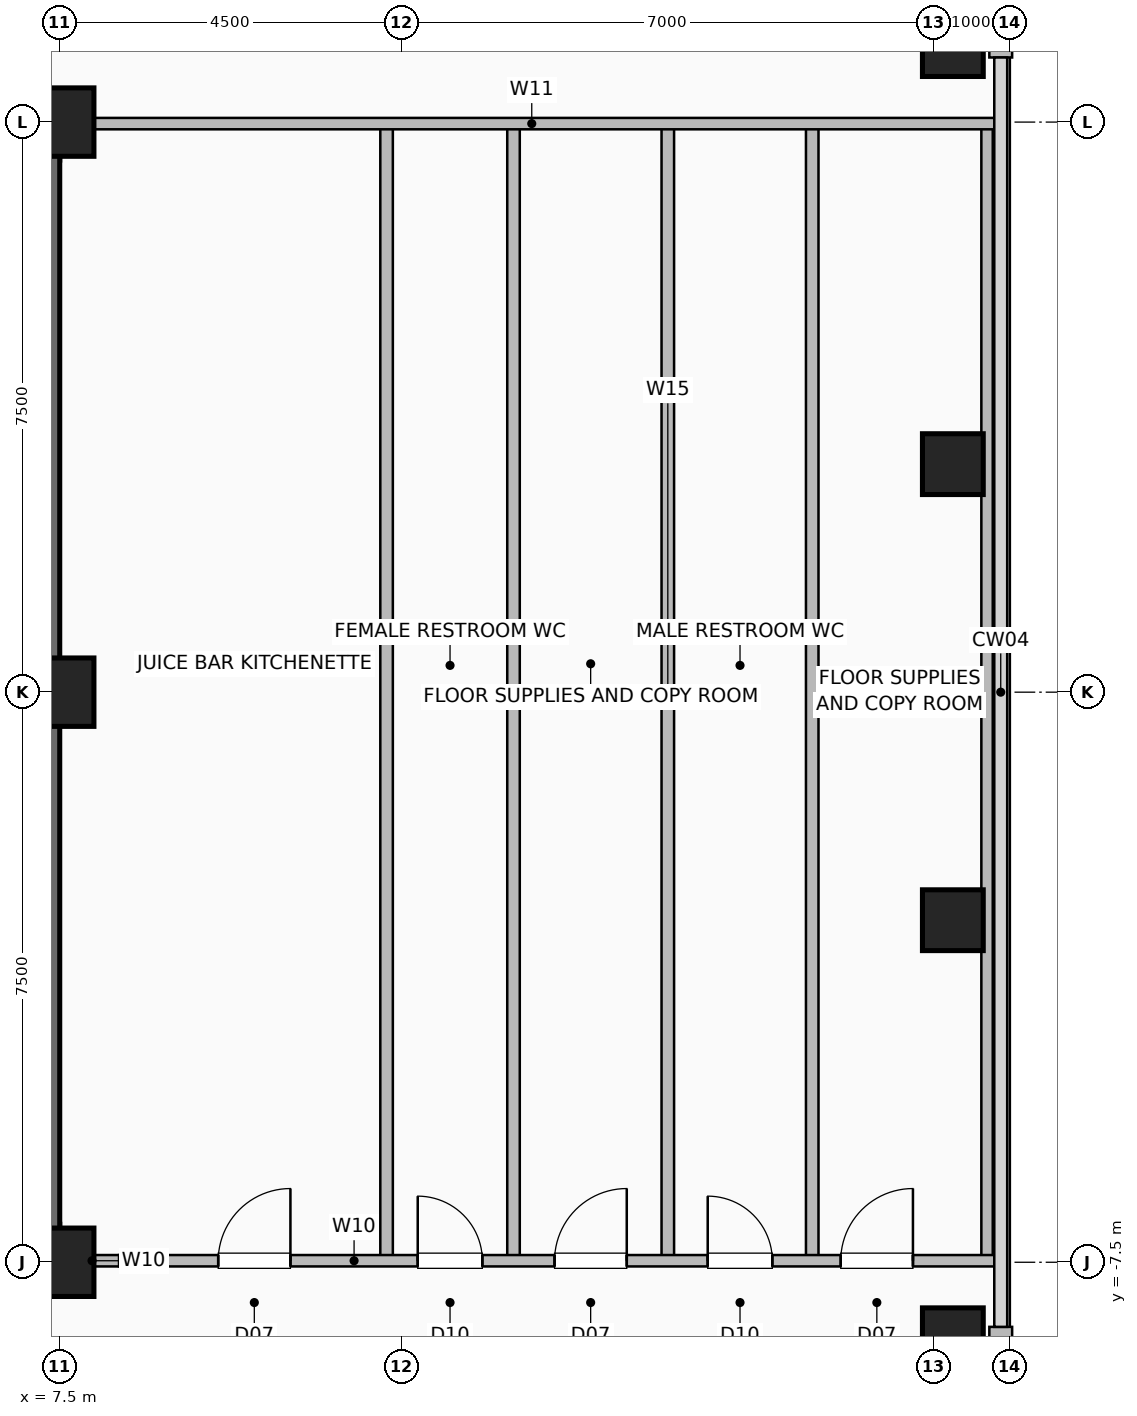
"""IFC4 building model, lengths in metres.
Left out: names, types, materials, properties, quantities, classifications, styles, units other than length and angle.
Written with IfcOpenShell. Run it as: python <this file> out.ifc"""

import sys

from ifc_helpers import new_model, si_unit, direction, frame, frame_2d, origin, origin_2d, place, context, subcontext, project, spatial, rectangle, hollow_rectangle, extrude, element, fill, save


model = new_model("IFC4")
c1 = context("Model", 3, precision=1e-05, world=origin(), true_north=direction((0.0, 1.0)))
c2 = subcontext(c1, "Body", "Model", "MODEL_VIEW")
j1 = project(units=[si_unit("LENGTHUNIT", "METRE"), si_unit("PLANEANGLEUNIT", "RADIAN")], contexts=[c1])
p1 = place(None, origin())
s1 = spatial("IfcSite", under=j1, at=p1, CompositionType="ELEMENT")
p2 = place(p1, origin())
s2 = spatial("IfcBuilding", under=s1, at=p2, CompositionType="ELEMENT")
p3 = place(p2, frame((0.0, 0.0, 202.2)))
s3 = spatial("IfcBuildingStorey", under=s2, at=p3, CompositionType="ELEMENT", Elevation=202.2)
for number, where, z_axis, x_axis in (
    (1, (7.5, -7.5, 0.0), (0.0, 0.0, 1.0), (1.0, 0.0, 0.0)),
    (2, (7.5, 0.0, 0.0), (0.0, 0.0, 1.0), (1.0, 0.0, 0.0)),
    (3, (7.5, 7.5, 0.0), (0.0, 0.0, 1.0), (1.0, 0.0, 0.0)),
):
    element("IfcColumn", number, at=place(p3, frame(where, z_axis=z_axis, x_axis=x_axis)), inside=s3, PredefinedType="COLUMN", context=c2, shape_type="SweptSolid", body=[
        extrude(hollow_rectangle(XDim=0.9, YDim=0.9, WallThickness=0.045, at=origin_2d()), origin(), (0.0, 0.0, 1.0), 3.6),
    ])
for number, where, z_axis, x_axis in (
    (4, (19.25, -8.5, 0.0), (0.0, 0.0, 1.0), (1.0, 0.0, 0.0)),
    (5, (19.25, -3.0, 0.0), (0.0, 0.0, 1.0), (1.0, 0.0, 0.0)),
    (6, (19.25, 3.0, 0.0), (0.0, 0.0, 1.0), (1.0, 0.0, 0.0)),
    (7, (19.25, 8.5, 0.0), (0.0, 0.0, 1.0), (1.0, 0.0, 0.0)),
):
    element("IfcColumn", number, at=place(p3, frame(where, z_axis=z_axis, x_axis=x_axis)), inside=s3, PredefinedType="COLUMN", context=c2, shape_type="SweptSolid", body=[
        extrude(hollow_rectangle(XDim=0.8, YDim=0.8, WallThickness=0.04, at=origin_2d()), origin(), (0.0, 0.0, 1.0), 3.6),
    ])
for number, where, z_axis, x_axis in (
    (8, (19.88, -13.15, 0.0), (0.0, 0.0, 1.0), (0.0, 1.0, 0.0)),
    (9, (19.88, 8.35, 0.0), (0.0, 0.0, 1.0), (0.0, 1.0, 0.0)),
):
    element("IfcWall", number, at=place(p3, frame(where, z_axis=z_axis, x_axis=x_axis)), inside=s3, PredefinedType="SOLIDWALL", context=c2, shape_type="SweptSolid", body=[
        extrude(rectangle(XDim=4.8, YDim=0.3, at=frame_2d((2.4, 0.0))), origin(), (0.0, 0.0, 1.0), 3.36),
    ])
p4 = place(p3, frame((-7.5, -7.25, 0.0), z_axis=(0.0, 0.0, 1.0), x_axis=(1.0, 0.0, 0.0)))
e10 = element("IfcWall", 10, at=p4, inside=s3, PredefinedType="SHEAR", context=c2, shape_type="SweptSolid", body=[
    extrude(rectangle(XDim=15.0, YDim=0.5, at=frame_2d((7.5, 0.0))), origin(), (0.0, 0.0, 1.0), 3.36),
])
p5 = place(p4, frame((1.55, 0.0, 0.0)))
e11 = element("IfcOpeningElement", 11, at=p5, cuts=e10, PredefinedType="OPENING", context=c2, shape_type="SweptSolid", body=[
    extrude(rectangle(XDim=1.05, YDim=2.08, at=frame_2d((0.525, 1.04))), frame((0.0, 0.26, 0.0), z_axis=(0.0, -1.0, 0.0), x_axis=(1.0, 0.0, 0.0)), (0.0, 0.0, 1.0), 0.52),
])
p6 = place(p4, frame((12.4, 0.0, 0.0)))
e12 = element("IfcOpeningElement", 12, at=p6, cuts=e10, PredefinedType="OPENING", context=c2, shape_type="SweptSolid", body=[
    extrude(rectangle(XDim=1.05, YDim=2.08, at=frame_2d((0.525, 1.04))), frame((0.0, 0.26, 0.0), z_axis=(0.0, -1.0, 0.0), x_axis=(1.0, 0.0, 0.0)), (0.0, 0.0, 1.0), 0.52),
])
p7 = place(p4, frame((5.2, 0.0, 0.0)))
e13 = element("IfcOpeningElement", 13, at=p7, cuts=e10, PredefinedType="OPENING", context=c2, shape_type="SweptSolid", body=[
    extrude(rectangle(XDim=1.0, YDim=2.08, at=frame_2d((0.5, 1.04))), frame((0.0, 0.26, 0.0), z_axis=(0.0, -1.0, 0.0), x_axis=(1.0, 0.0, 0.0)), (0.0, 0.0, 1.0), 0.52),
])
p8 = place(p4, frame((8.65, 0.0, 0.0)))
e14 = element("IfcOpeningElement", 14, at=p8, cuts=e10, PredefinedType="OPENING", context=c2, shape_type="SweptSolid", body=[
    extrude(rectangle(XDim=1.0, YDim=2.08, at=frame_2d((0.5, 1.04))), frame((0.0, 0.26, 0.0), z_axis=(0.0, -1.0, 0.0), x_axis=(1.0, 0.0, 0.0)), (0.0, 0.0, 1.0), 0.52),
])
for number, where, z_axis, x_axis in (
    (15, (-7.5, 7.25, 0.0), (0.0, 0.0, 1.0), (1.0, 0.0, 0.0)),
    (16, (7.25, -7.5, 0.0), (0.0, 0.0, 1.0), (0.0, 1.0, 0.0)),
):
    element("IfcWall", number, at=place(p3, frame(where, z_axis=z_axis, x_axis=x_axis)), inside=s3, PredefinedType="SHEAR", context=c2, shape_type="SweptSolid", body=[
        extrude(rectangle(XDim=15.0, YDim=0.5, at=frame_2d((7.5, 0.0))), origin(), (0.0, 0.0, 1.0), 3.36),
    ])
p9 = place(p3, frame((7.45, -7.48, 0.0), z_axis=(0.0, 0.0, 1.0), x_axis=(1.0, 0.0, 0.0)))
e17 = element("IfcWall", 17, at=p9, inside=s3, PredefinedType="PARTITIONING", context=c2, shape_type="SweptSolid", body=[
    extrude(rectangle(XDim=0.95, YDim=0.15, at=frame_2d((0.475, 0.0))), origin(), (0.0, 0.0, 1.0), 3.36),
])
for number, where, z_axis, x_axis in (
    (18, (13.47, -7.48, 0.0), (0.0, 0.0, 1.0), (0.0, 1.0, 0.0)),
    (19, (17.4, -7.48, 0.0), (0.0, 0.0, 1.0), (0.0, 1.0, 0.0)),
    (20, (11.8, -7.48, 0.0), (0.0, 0.0, 1.0), (0.0, 1.0, 0.0)),
    (21, (15.5, -7.48, 0.0), (0.0, 0.0, 1.0), (0.0, 1.0, 0.0)),
):
    element("IfcWall", number, at=place(p3, frame(where, z_axis=z_axis, x_axis=x_axis)), inside=s3, PredefinedType="PLUMBINGWALL", context=c2, shape_type="SweptSolid", body=[
        extrude(rectangle(XDim=14.9, YDim=0.165, at=frame_2d((7.45, 0.0))), origin(), (0.0, 0.0, 1.0), 3.36),
    ])
p10 = place(p3, frame((19.7, -7.48, 0.0), z_axis=(0.0, 0.0, 1.0), x_axis=(0.0, 1.0, 0.0)))
e22 = element("IfcWall", 22, at=p10, inside=s3, PredefinedType="PARTITIONING", context=c2, shape_type="SweptSolid", body=[
    extrude(rectangle(XDim=14.9, YDim=0.15, at=frame_2d((7.45, 0.0))), origin(), (0.0, 0.0, 1.0), 3.36),
])
p11 = place(p3, frame((8.28, -7.48, 0.0), z_axis=(0.0, 0.0, 1.0), x_axis=(1.0, 0.0, 0.0)))
e23 = element("IfcWall", 23, at=p11, inside=s3, PredefinedType="PARTITIONING", context=c2, shape_type="SweptSolid", body=[
    extrude(rectangle(XDim=11.54, YDim=0.15, at=frame_2d((5.77, 0.0))), origin(), (0.0, 0.0, 1.0), 3.36),
])
p12 = place(p11, frame((1.305, 0.0, 0.0)))
e24 = element("IfcOpeningElement", 24, at=p12, cuts=e23, PredefinedType="OPENING", context=c2, shape_type="SweptSolid", body=[
    extrude(rectangle(XDim=0.95, YDim=2.06, at=frame_2d((0.475, 1.03))), frame((0.0, 0.085, 0.0), z_axis=(0.0, -1.0, 0.0), x_axis=(1.0, 0.0, 0.0)), (0.0, 0.0, 1.0), 0.17),
])
p13 = place(p11, frame((3.93, 0.0, 0.0)))
e25 = element("IfcOpeningElement", 25, at=p13, cuts=e23, PredefinedType="OPENING", context=c2, shape_type="SweptSolid", body=[
    extrude(rectangle(XDim=0.85, YDim=2.05, at=frame_2d((0.425, 1.025))), frame((0.0, 0.085, 0.0), z_axis=(0.0, -1.0, 0.0), x_axis=(1.0, 0.0, 0.0)), (0.0, 0.0, 1.0), 0.17),
])
p14 = place(p11, frame((5.73, 0.0, 0.0)))
e26 = element("IfcOpeningElement", 26, at=p14, cuts=e23, PredefinedType="OPENING", context=c2, shape_type="SweptSolid", body=[
    extrude(rectangle(XDim=0.95, YDim=2.06, at=frame_2d((0.475, 1.03))), frame((0.0, 0.085, 0.0), z_axis=(0.0, -1.0, 0.0), x_axis=(1.0, 0.0, 0.0)), (0.0, 0.0, 1.0), 0.17),
])
p15 = place(p11, frame((7.745, 0.0, 0.0)))
e27 = element("IfcOpeningElement", 27, at=p15, cuts=e23, PredefinedType="OPENING", context=c2, shape_type="SweptSolid", body=[
    extrude(rectangle(XDim=0.85, YDim=2.05, at=frame_2d((0.425, 1.025))), frame((0.0, 0.085, 0.0), z_axis=(0.0, -1.0, 0.0), x_axis=(1.0, 0.0, 0.0)), (0.0, 0.0, 1.0), 0.17),
])
p16 = place(p11, frame((9.495, 0.0, 0.0)))
e28 = element("IfcOpeningElement", 28, at=p16, cuts=e23, PredefinedType="OPENING", context=c2, shape_type="SweptSolid", body=[
    extrude(rectangle(XDim=0.95, YDim=2.06, at=frame_2d((0.475, 1.03))), frame((0.0, 0.085, 0.0), z_axis=(0.0, -1.0, 0.0), x_axis=(1.0, 0.0, 0.0)), (0.0, 0.0, 1.0), 0.17),
])
p17 = place(p3, frame((7.6, 7.48, 0.0), z_axis=(0.0, 0.0, 1.0), x_axis=(1.0, 0.0, 0.0)))
e29 = element("IfcWall", 29, at=p17, inside=s3, PredefinedType="PARTITIONING", context=c2, shape_type="SweptSolid", body=[
    extrude(rectangle(XDim=12.22, YDim=0.15, at=frame_2d((6.11, 0.0))), origin(), (0.0, 0.0, 1.0), 3.36),
])
p18 = place(p12, origin())
e30 = element("IfcDoor", 30, at=p18, inside=s3, OperationType="SINGLE_SWING_RIGHT", PredefinedType="DOOR", context=c2, shape_type="SweptSolid", body=[
    extrude(rectangle(XDim=0.95, YDim=2.06, at=frame_2d((0.475, 1.03))), frame((0.0, 0.025, 0.0), z_axis=(0.0, -1.0, 0.0), x_axis=(1.0, 0.0, 0.0)), (0.0, 0.0, 1.0), 0.05),
])
fill(e24, e30)
p19 = place(p13, origin())
e31 = element("IfcDoor", 31, at=p19, inside=s3, OperationType="SINGLE_SWING_LEFT", PredefinedType="DOOR", context=c2, shape_type="SweptSolid", body=[
    extrude(rectangle(XDim=0.85, YDim=2.05, at=frame_2d((0.425, 1.025))), frame((0.0, 0.025, 0.0), z_axis=(0.0, -1.0, 0.0), x_axis=(1.0, 0.0, 0.0)), (0.0, 0.0, 1.0), 0.05),
])
fill(e25, e31)
p20 = place(p14, origin())
e32 = element("IfcDoor", 32, at=p20, inside=s3, OperationType="SINGLE_SWING_RIGHT", PredefinedType="DOOR", context=c2, shape_type="SweptSolid", body=[
    extrude(rectangle(XDim=0.95, YDim=2.06, at=frame_2d((0.475, 1.03))), frame((0.0, 0.025, 0.0), z_axis=(0.0, -1.0, 0.0), x_axis=(1.0, 0.0, 0.0)), (0.0, 0.0, 1.0), 0.05),
])
fill(e26, e32)
p21 = place(p15, origin())
e33 = element("IfcDoor", 33, at=p21, inside=s3, OperationType="SINGLE_SWING_LEFT", PredefinedType="DOOR", context=c2, shape_type="SweptSolid", body=[
    extrude(rectangle(XDim=0.85, YDim=2.05, at=frame_2d((0.425, 1.025))), frame((0.0, 0.025, 0.0), z_axis=(0.0, -1.0, 0.0), x_axis=(1.0, 0.0, 0.0)), (0.0, 0.0, 1.0), 0.05),
])
fill(e27, e33)
p22 = place(p16, origin())
e34 = element("IfcDoor", 34, at=p22, inside=s3, OperationType="SINGLE_SWING_RIGHT", PredefinedType="DOOR", context=c2, shape_type="SweptSolid", body=[
    extrude(rectangle(XDim=0.95, YDim=2.06, at=frame_2d((0.475, 1.03))), frame((0.0, 0.025, 0.0), z_axis=(0.0, -1.0, 0.0), x_axis=(1.0, 0.0, 0.0)), (0.0, 0.0, 1.0), 0.05),
])
fill(e28, e34)
save(model, sys.argv[1])
